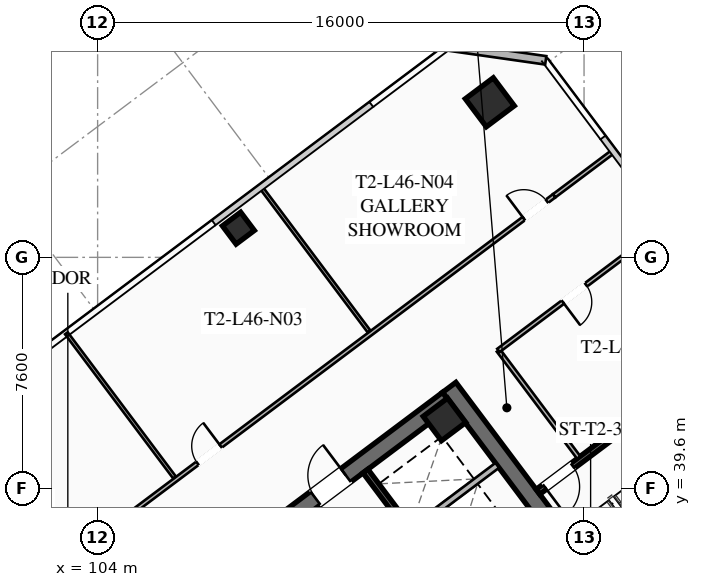
"""IFC4 building model, lengths in metres.
Left out: names, types, materials, properties, quantities, classifications, styles, units other than length and angle.
Written with IfcOpenShell. Run it as: python <this file> out.ifc"""

import sys

from ifc_helpers import new_model, si_unit, direction, frame, frame_2d, origin, origin_2d, place, context, subcontext, project, spatial, rectangle, hollow_rectangle, extrude, element, fill, save


model = new_model("IFC4")
c1 = context("Model", 3, precision=1e-05, world=origin(), true_north=direction((0.0, 1.0)))
c2 = subcontext(c1, "Body", "Model", "MODEL_VIEW")
j1 = project(units=[si_unit("LENGTHUNIT", "METRE"), si_unit("PLANEANGLEUNIT", "RADIAN")], contexts=[c1])
p1 = place(None, origin())
s1 = spatial("IfcSite", under=j1, at=p1, CompositionType="ELEMENT")
p2 = place(p1, origin())
s2 = spatial("IfcBuilding", under=s1, at=p2, CompositionType="ELEMENT")
p3 = place(p2, frame((0.0, 0.0, 171.2)))
s3 = spatial("IfcBuildingStorey", under=s2, at=p3, CompositionType="ELEMENT", Elevation=171.2)
p4 = place(p3, frame((115.564, 42.923, 0.0), z_axis=(0.0, 0.0, 1.0), x_axis=(0.600005007985, -0.799996243986, 0.0)))
e1 = element("IfcWall", 1, at=p4, inside=s3, PredefinedType="SHEAR", context=c2, shape_type="SweptSolid", body=[
    extrude(rectangle(XDim=15.6, YDim=0.55, at=frame_2d((7.8, 0.0))), origin(), (0.0, 0.0, 1.0), 3.55),
])
p5 = place(p3, frame((103.461, 33.502, 0.0), z_axis=(0.0, 0.0, 1.0), x_axis=(0.799998054672, 0.600002593761, 0.0)))
e2 = element("IfcWall", 2, at=p5, inside=s3, PredefinedType="SHEAR", context=c2, shape_type="SweptSolid", body=[
    extrude(rectangle(XDim=15.06, YDim=0.55, at=frame_2d((7.53, 0.0))), origin(), (0.0, 0.0, 1.0), 3.55),
])
p6 = place(p5, frame((4.58, 0.0, 0.0)))
e3 = element("IfcOpeningElement", 3, at=p6, cuts=e2, PredefinedType="OPENING", context=c2, shape_type="SweptSolid", body=[
    extrude(rectangle(XDim=1.25, YDim=2.25, at=frame_2d((0.625, 1.125))), frame((0.0, 0.285, 0.0), z_axis=(0.0, -1.0, 0.0), x_axis=(1.0, 0.0, 0.0)), (0.0, 0.0, 1.0), 0.57),
])
p7 = place(p5, frame((9.63, 0.0, 0.0)))
e4 = element("IfcOpeningElement", 4, at=p7, cuts=e2, PredefinedType="OPENING", context=c2, shape_type="SweptSolid", body=[
    extrude(rectangle(XDim=1.25, YDim=2.25, at=frame_2d((0.625, 1.125))), frame((0.0, 0.285, 0.0), z_axis=(0.0, -1.0, 0.0), x_axis=(1.0, 0.0, 0.0)), (0.0, 0.0, 1.0), 0.57),
])
p8 = place(p3, frame((115.41, 41.87, 0.0), z_axis=(0.0, 0.0, 1.0), x_axis=(0.799999996291, 0.600000004945, 0.0)))
e5 = element("IfcColumn", 5, at=p8, inside=s3, PredefinedType="COLUMN", context=c2, shape_type="SweptSolid", body=[
    extrude(hollow_rectangle(XDim=1.0, YDim=1.0, WallThickness=0.04, at=origin_2d()), origin(), (0.0, 0.0, 1.0), 3.37),
])
p9 = place(p3, frame((116.9, 52.3, 0.0), z_axis=(0.0, 0.0, 1.0), x_axis=(0.799999996291, 0.600000004945, 0.0)))
e6 = element("IfcColumn", 6, at=p9, inside=s3, PredefinedType="COLUMN", context=c2, shape_type="SweptSolid", body=[
    extrude(hollow_rectangle(XDim=1.15, YDim=1.15, WallThickness=0.045, at=origin_2d()), origin(), (0.0, 0.0, 1.0), 3.37),
])
p10 = place(p3, frame((108.63, 48.16, 0.0), z_axis=(0.0, 0.0, 1.0), x_axis=(0.799999996291, 0.600000004945, 0.0)))
e7 = element("IfcColumn", 7, at=p10, inside=s3, PredefinedType="COLUMN", context=c2, shape_type="SweptSolid", body=[
    extrude(hollow_rectangle(XDim=0.75, YDim=0.75, WallThickness=0.032, at=origin_2d()), origin(), (0.0, 0.0, 1.0), 3.37),
])
p11 = place(p3, frame((115.52, 54.14, 0.0), z_axis=(0.0, 0.0, 1.0), x_axis=(0.989950994782, -0.141410847992, 0.0)))
e8 = element("IfcWall", 8, at=p11, inside=s3, PredefinedType="SOLIDWALL", context=c2, shape_type="SweptSolid", body=[
    extrude(rectangle(XDim=3.253, YDim=0.28, at=frame_2d((1.626, 0.0))), origin(), (0.0, 0.0, 1.0), 3.37),
])
p12 = place(p3, frame((112.81, 40.17, 0.0), z_axis=(0.0, 0.0, 1.0), x_axis=(0.599993943644, -0.800004542231, 0.0)))
e9 = element("IfcWall", 9, at=p12, inside=s3, PredefinedType="SHEAR", context=c2, shape_type="SweptSolid", body=[
    extrude(rectangle(XDim=6.45, YDim=0.2, at=frame_2d((3.225, 0.0))), origin(), (0.0, 0.0, 1.0), 3.37),
])
p13 = place(p3, frame((114.36, 38.27, 0.0), z_axis=(0.0, 0.0, 1.0), x_axis=(0.800008418847, 0.599988774707, 0.0)))
e10 = element("IfcWall", 10, at=p13, inside=s3, PredefinedType="SOLIDWALL", context=c2, shape_type="SweptSolid", body=[
    extrude(rectangle(XDim=3.48, YDim=0.2, at=frame_2d((1.74, 0.0))), origin(), (0.0, 0.0, 1.0), 3.37),
])
p14 = place(p3, frame((125.304, 36.228, 0.0), z_axis=(0.0, 0.0, 1.0), x_axis=(-0.59998851072, 0.800008616831, 0.0)))
e11 = element("IfcWall", 11, at=p14, inside=s3, PredefinedType="SHEAR", context=c2, shape_type="SweptSolid", body=[
    extrude(rectangle(XDim=6.8, YDim=0.2, at=frame_2d((3.4, 0.0))), origin(), (0.0, 0.0, 1.0), 3.37),
])
p15 = place(p3, frame((121.204, 41.528, 0.0), z_axis=(0.0, 0.0, 1.0), x_axis=(-0.800017232136, -0.599977023131, 0.0)))
e12 = element("IfcWall", 12, at=p15, inside=s3, PredefinedType="SHEAR", context=c2, shape_type="SweptSolid", body=[
    extrude(rectangle(XDim=3.4, YDim=0.2, at=frame_2d((1.7, 0.0))), origin(), (0.0, 0.0, 1.0), 3.37),
])
p16 = place(p15, frame((1.975, 0.0, 0.0)))
e13 = element("IfcOpeningElement", 13, at=p16, cuts=e12, PredefinedType="OPENING", context=c2, shape_type="SweptSolid", body=[
    extrude(rectangle(XDim=1.15, YDim=2.2, at=frame_2d((0.575, 1.1))), frame((0.0, 0.11, 0.0), z_axis=(0.0, -1.0, 0.0), x_axis=(1.0, 0.0, 0.0)), (0.0, 0.0, 1.0), 0.22),
])
p17 = place(p3, frame((119.824, 40.618, 0.0), z_axis=(0.0, 0.0, 1.0), x_axis=(-0.599982243973, 0.800013316712, 0.0)))
e14 = element("IfcWall", 14, at=p17, inside=s3, PredefinedType="PARTITIONING", context=c2, shape_type="SweptSolid", body=[
    extrude(rectangle(XDim=4.4, YDim=0.135, at=frame_2d((2.2, 0.0))), origin(), (0.0, 0.0, 1.0), 2.723),
])
p18 = place(p3, frame((96.058, 32.006, 0.0), z_axis=(0.0, 0.0, 1.0), x_axis=(0.8, 0.6, 0.0)))
e15 = element("IfcWall", 15, at=p18, inside=s3, PredefinedType="PARTITIONING", context=c2, shape_type="SweptSolid", body=[
    extrude(rectangle(XDim=28.7, YDim=0.135, at=frame_2d((14.35, 0.0))), origin(), (0.0, 0.0, 1.0), 2.723),
])
p19 = place(p18, frame((0.3, 0.0, 0.0)))
e16 = element("IfcOpeningElement", 16, at=p19, cuts=e15, PredefinedType="OPENING", context=c2, shape_type="SweptSolid", body=[
    extrude(rectangle(XDim=0.95, YDim=2.05, at=frame_2d((0.475, 1.025))), frame((0.0, 0.077, 0.0), z_axis=(0.0, -1.0, 0.0), x_axis=(1.0, 0.0, 0.0)), (0.0, 0.0, 1.0), 0.155),
])
p20 = place(p18, frame((10.01, 0.0, 0.0)))
e17 = element("IfcOpeningElement", 17, at=p20, cuts=e15, PredefinedType="OPENING", context=c2, shape_type="SweptSolid", body=[
    extrude(rectangle(XDim=0.95, YDim=2.05, at=frame_2d((0.475, 1.025))), frame((0.0, 0.077, 0.0), z_axis=(0.0, -1.0, 0.0), x_axis=(1.0, 0.0, 0.0)), (0.0, 0.0, 1.0), 0.155),
])
p21 = place(p18, frame((14.033, 0.0, 0.0)))
e18 = element("IfcOpeningElement", 18, at=p21, cuts=e15, PredefinedType="OPENING", context=c2, shape_type="SweptSolid", body=[
    extrude(rectangle(XDim=0.95, YDim=2.05, at=frame_2d((0.475, 1.025))), frame((0.0, 0.077, 0.0), z_axis=(0.0, -1.0, 0.0), x_axis=(1.0, 0.0, 0.0)), (0.0, 0.0, 1.0), 0.155),
])
p22 = place(p18, frame((27.45, 0.0, 0.0)))
e19 = element("IfcOpeningElement", 19, at=p22, cuts=e15, PredefinedType="OPENING", context=c2, shape_type="SweptSolid", body=[
    extrude(rectangle(XDim=0.95, YDim=2.05, at=frame_2d((0.475, 1.025))), frame((0.0, 0.077, 0.0), z_axis=(0.0, -1.0, 0.0), x_axis=(1.0, 0.0, 0.0)), (0.0, 0.0, 1.0), 0.155),
])
p23 = place(p3, frame((119.018, 49.226, 0.0), z_axis=(0.0, 0.0, 1.0), x_axis=(0.799975885537, 0.600032151272, 0.0)))
e20 = element("IfcWall", 20, at=p23, inside=s3, PredefinedType="PARTITIONING", context=c2, shape_type="SweptSolid", body=[
    extrude(rectangle(XDim=2.43, YDim=0.135, at=frame_2d((1.215, 0.0))), origin(), (0.0, 0.0, 1.0), 2.723),
])
p24 = place(p3, frame((106.53, 39.96, 0.0), z_axis=(0.0, 0.0, 1.0), x_axis=(-0.6, 0.8, 0.0)))
e21 = element("IfcWall", 21, at=p24, inside=s3, PredefinedType="PARTITIONING", context=c2, shape_type="SweptSolid", body=[
    extrude(rectangle(XDim=5.93, YDim=0.11, at=frame_2d((2.965, 0.0))), origin(), (0.0, 0.0, 1.0), 2.723),
])
p25 = place(p3, frame((112.93, 44.76, 0.0), z_axis=(0.0, 0.0, 1.0), x_axis=(-0.599993412527, 0.800004940562, 0.0)))
e22 = element("IfcWall", 22, at=p25, inside=s3, PredefinedType="PARTITIONING", context=c2, shape_type="SweptSolid", body=[
    extrude(rectangle(XDim=5.93, YDim=0.11, at=frame_2d((2.965, 0.0))), origin(), (0.0, 0.0, 1.0), 2.723),
])
p26 = place(p3, frame((122.744, 48.308, 0.0), z_axis=(0.0, 0.0, 1.0), x_axis=(-0.79997892247, -0.600028102345, 0.0)))
e23 = element("IfcWall", 23, at=p26, inside=s3, PredefinedType="PARTITIONING", context=c2, shape_type="SweptSolid", body=[
    extrude(rectangle(XDim=6.95, YDim=0.135, at=frame_2d((3.475, 0.0))), origin(), (0.0, 0.0, 1.0), 2.723),
])
p27 = place(p26, frame((3.35, 0.0, 0.0)))
e24 = element("IfcOpeningElement", 24, at=p27, cuts=e23, PredefinedType="OPENING", context=c2, shape_type="SweptSolid", body=[
    extrude(rectangle(XDim=0.95, YDim=2.05, at=frame_2d((0.475, 1.025))), frame((0.0, 0.077, 0.0), z_axis=(0.0, -1.0, 0.0), x_axis=(1.0, 0.0, 0.0)), (0.0, 0.0, 1.0), 0.155),
])
p28 = place(p7, origin())
e25 = element("IfcDoor", 25, at=p28, inside=s3, OperationType="SINGLE_SWING_RIGHT", PredefinedType="DOOR", context=c2, shape_type="SweptSolid", body=[
    extrude(rectangle(XDim=1.25, YDim=2.25, at=frame_2d((0.625, 1.125))), frame((0.0, 0.025, 0.0), z_axis=(0.0, -1.0, 0.0), x_axis=(1.0, 0.0, 0.0)), (0.0, 0.0, 1.0), 0.05),
])
fill(e4, e25)
p29 = place(p16, origin())
e26 = element("IfcDoor", 26, at=p29, inside=s3, OperationType="SINGLE_SWING_RIGHT", PredefinedType="DOOR", context=c2, shape_type="SweptSolid", body=[
    extrude(rectangle(XDim=1.15, YDim=2.2, at=frame_2d((0.575, 1.1))), frame((0.0, 0.025, 0.0), z_axis=(0.0, -1.0, 0.0), x_axis=(1.0, 0.0, 0.0)), (0.0, 0.0, 1.0), 0.05),
])
fill(e13, e26)
p30 = place(p21, origin())
e27 = element("IfcDoor", 27, at=p30, inside=s3, OperationType="SINGLE_SWING_RIGHT", PredefinedType="DOOR", context=c2, shape_type="SweptSolid", body=[
    extrude(rectangle(XDim=0.95, YDim=2.05, at=frame_2d((0.475, 1.025))), frame((0.0, 0.025, 0.0), z_axis=(0.0, -1.0, 0.0), x_axis=(1.0, 0.0, 0.0)), (0.0, 0.0, 1.0), 0.05),
])
fill(e18, e27)
p31 = place(p22, origin())
e28 = element("IfcDoor", 28, at=p31, inside=s3, OperationType="SINGLE_SWING_LEFT", PredefinedType="DOOR", context=c2, shape_type="SweptSolid", body=[
    extrude(rectangle(XDim=0.95, YDim=2.05, at=frame_2d((0.475, 1.025))), frame((0.0, 0.025, 0.0), z_axis=(0.0, -1.0, 0.0), x_axis=(1.0, 0.0, 0.0)), (0.0, 0.0, 1.0), 0.05),
])
fill(e19, e28)
p32 = place(p27, origin())
e29 = element("IfcDoor", 29, at=p32, inside=s3, OperationType="SINGLE_SWING_RIGHT", PredefinedType="DOOR", context=c2, shape_type="SweptSolid", body=[
    extrude(rectangle(XDim=0.95, YDim=2.05, at=frame_2d((0.475, 1.025))), frame((0.0, 0.025, 0.0), z_axis=(0.0, -1.0, 0.0), x_axis=(1.0, 0.0, 0.0)), (0.0, 0.0, 1.0), 0.05),
])
fill(e24, e29)
save(model, sys.argv[1])
